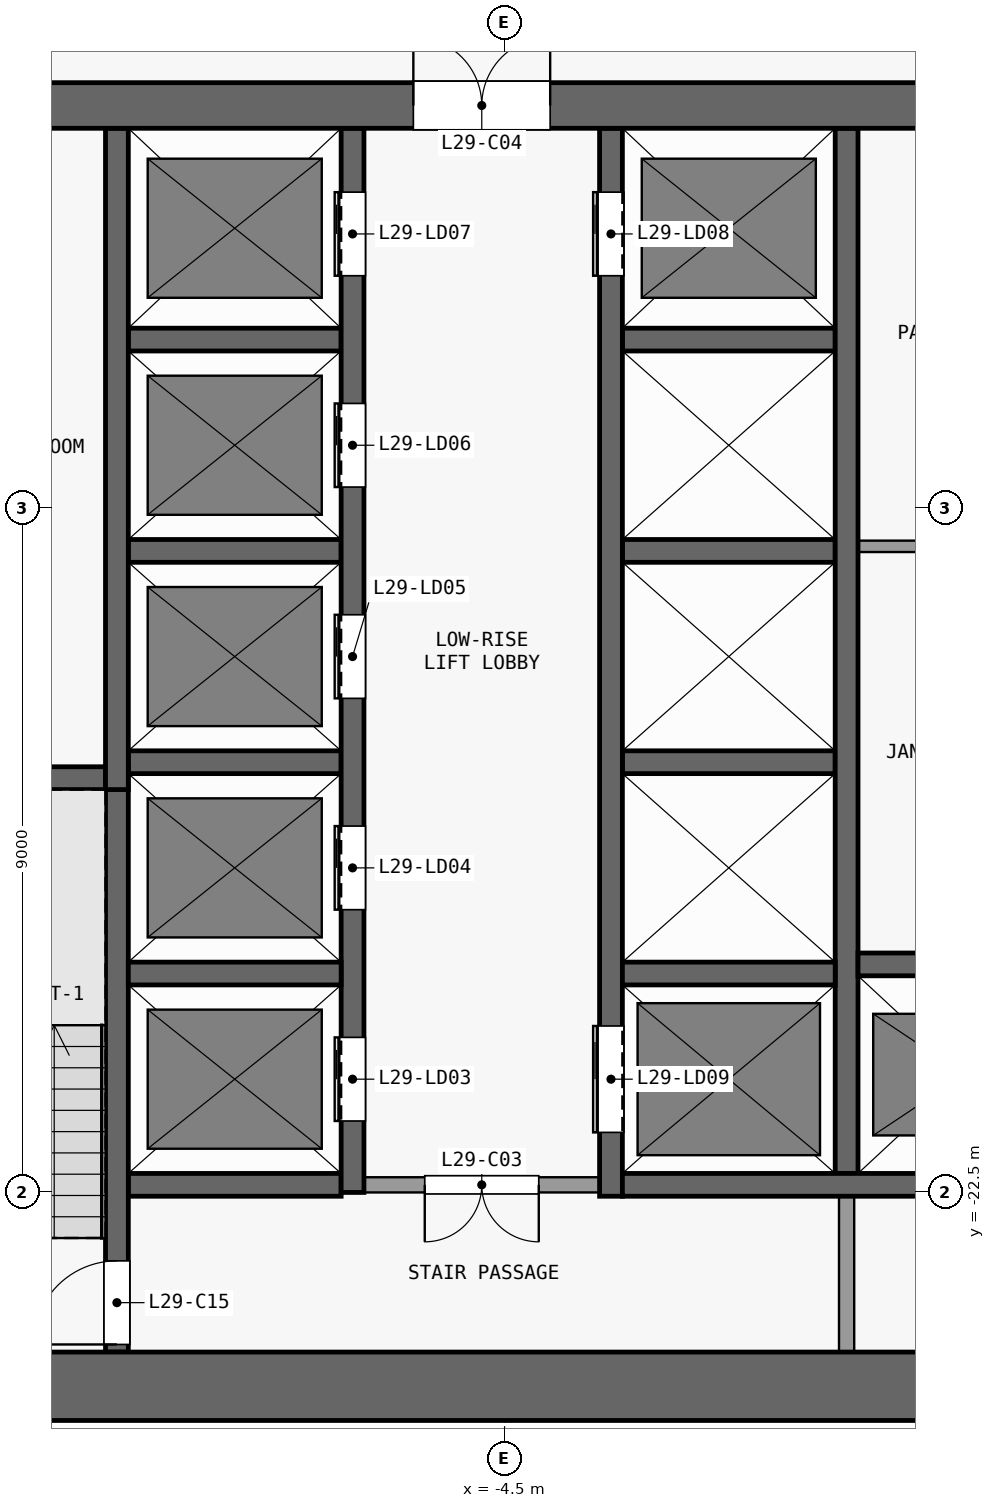
"""IFC4 building model, lengths in metres.
Left out: names, types, materials, properties, quantities, classifications, styles, units other than length and angle.
Written with IfcOpenShell. Run it as: python <this file> out.ifc"""

import sys

from ifc_helpers import new_model, si_unit, direction, frame, frame_2d, origin, place, context, subcontext, project, spatial, rectangle, extrude, element, fill, save


model = new_model("IFC4")
c1 = context("Model", 3, precision=1e-05, world=origin(), true_north=direction((0.0, 1.0)))
c2 = subcontext(c1, "Body", "Model", "MODEL_VIEW")
j1 = project(units=[si_unit("LENGTHUNIT", "METRE"), si_unit("PLANEANGLEUNIT", "RADIAN")], contexts=[c1])
p1 = place(None, origin())
s1 = spatial("IfcSite", under=j1, at=p1, CompositionType="ELEMENT")
p2 = place(p1, origin())
s2 = spatial("IfcBuilding", under=s1, at=p2, CompositionType="ELEMENT")
p3 = place(p2, frame((0.0, 0.0, 117.1)))
s3 = spatial("IfcBuildingStorey", under=s2, at=p3, CompositionType="ELEMENT", Elevation=117.1)
p4 = place(p3, frame((-13.4, -25.05, 0.0), z_axis=(0.0, 0.0, 1.0), x_axis=(1.0, 0.0, 0.0)))
e1 = element("IfcWall", 1, at=p4, inside=s3, PredefinedType="SHEAR", context=c2, shape_type="SweptSolid", body=[
    extrude(rectangle(XDim=26.8, YDim=0.9, at=frame_2d((13.4, 0.0))), origin(), (0.0, 0.0, 1.0), 3.3),
])
p5 = place(p3, frame((-13.4, -8.2, 0.0), z_axis=(0.0, 0.0, 1.0), x_axis=(1.0, 0.0, 0.0)))
e2 = element("IfcWall", 2, at=p5, inside=s3, PredefinedType="SHEAR", context=c2, shape_type="SweptSolid", body=[
    extrude(rectangle(XDim=26.8, YDim=0.6, at=frame_2d((13.4, 0.0))), origin(), (0.0, 0.0, 1.0), 3.3),
])
p6 = place(p5, frame((7.7, 0.0, 0.0)))
e3 = element("IfcOpeningElement", 3, at=p6, cuts=e2, PredefinedType="OPENING", context=c2, shape_type="SweptSolid", body=[
    extrude(rectangle(XDim=1.8, YDim=2.1, at=frame_2d((0.9, 1.05))), frame((0.0, 0.31, 0.0), z_axis=(0.0, -1.0, 0.0), x_axis=(1.0, 0.0, 0.0)), (0.0, 0.0, 1.0), 0.62),
])
p7 = place(p5, frame((17.3, 0.0, 0.0)))
e4 = element("IfcOpeningElement", 4, at=p7, cuts=e2, PredefinedType="OPENING", context=c2, shape_type="SweptSolid", body=[
    extrude(rectangle(XDim=1.8, YDim=2.1, at=frame_2d((0.9, 1.05))), frame((0.0, 0.31, 0.0), z_axis=(0.0, -1.0, 0.0), x_axis=(1.0, 0.0, 0.0)), (0.0, 0.0, 1.0), 0.62),
])
p8 = place(p5, frame((1.625, 0.0, 0.0)))
e5 = element("IfcOpeningElement", 5, at=p8, cuts=e2, PredefinedType="OPENING", context=c2, shape_type="SweptSolid", body=[
    extrude(rectangle(XDim=1.2, YDim=2.1, at=frame_2d((0.6, 1.05))), frame((0.0, 0.31, 0.0), z_axis=(0.0, -1.0, 0.0), x_axis=(1.0, 0.0, 0.0)), (0.0, 0.0, 1.0), 0.62),
])
p9 = place(p5, frame((23.275, 0.0, 0.0)))
e6 = element("IfcOpeningElement", 6, at=p9, cuts=e2, PredefinedType="OPENING", context=c2, shape_type="SweptSolid", body=[
    extrude(rectangle(XDim=0.9, YDim=2.1, at=frame_2d((0.45, 1.05))), frame((0.0, 0.31, 0.0), z_axis=(0.0, -1.0, 0.0), x_axis=(1.0, 0.0, 0.0)), (0.0, 0.0, 1.0), 0.62),
])
p10 = place(p3, frame((-9.45, -22.4, 0.0), z_axis=(0.0, 0.0, 1.0), x_axis=(1.0, 0.0, 0.0)))
e7 = element("IfcWall", 7, at=p10, inside=s3, PredefinedType="SHEAR", context=c2, shape_type="SweptSolid", body=[
    extrude(rectangle(XDim=2.8, YDim=0.3, at=frame_2d((1.4, 0.0))), origin(), (0.0, 0.0, 1.0), 3.3),
])
p11 = place(p3, frame((-3.25, -22.4, 0.0), z_axis=(0.0, 0.0, 1.0), x_axis=(-1.0, 0.0, 0.0)))
e8 = element("IfcWall", 8, at=p11, inside=s3, PredefinedType="PARTITIONING", context=c2, shape_type="SweptSolid", body=[
    extrude(rectangle(XDim=3.1, YDim=0.2, at=frame_2d((1.55, 0.0))), origin(), (0.0, 0.0, 1.0), 3.3),
])
p12 = place(p11, frame((0.8, 0.0, 0.0)))
e9 = element("IfcOpeningElement", 9, at=p12, cuts=e8, PredefinedType="OPENING", context=c2, shape_type="SweptSolid", body=[
    extrude(rectangle(XDim=1.5, YDim=2.1, at=frame_2d((0.75, 1.05))), frame((0.0, 0.11, 0.0), z_axis=(0.0, -1.0, 0.0), x_axis=(1.0, 0.0, 0.0)), (0.0, 0.0, 1.0), 0.22),
])
p13 = place(p3, frame((-2.95, -22.4, 0.0), z_axis=(0.0, 0.0, 1.0), x_axis=(1.0, 0.0, 0.0)))
e10 = element("IfcWall", 10, at=p13, inside=s3, PredefinedType="SHEAR", context=c2, shape_type="SweptSolid", body=[
    extrude(rectangle(XDim=6.2, YDim=0.3, at=frame_2d((3.1, 0.0))), origin(), (0.0, 0.0, 1.0), 3.3),
])
for number, where, z_axis, x_axis in (
    (11, (-9.45, -19.62, 0.0), (0.0, 0.0, 1.0), (1.0, 0.0, 0.0)),
    (12, (-2.95, -19.62, 0.0), (0.0, 0.0, 1.0), (1.0, 0.0, 0.0)),
):
    element("IfcWall", number, at=place(p3, frame(where, z_axis=z_axis, x_axis=x_axis)), inside=s3, PredefinedType="SHEAR", context=c2, shape_type="SweptSolid", body=[
        extrude(rectangle(XDim=2.8, YDim=0.3, at=frame_2d((1.4, 0.0))), origin(), (0.0, 0.0, 1.0), 3.3),
    ])
p14 = place(p3, frame((0.15, -19.5, 0.0), z_axis=(0.0, 0.0, 1.0), x_axis=(1.0, 0.0, 0.0)))
e13 = element("IfcWall", 13, at=p14, inside=s3, PredefinedType="SHEAR", context=c2, shape_type="SweptSolid", body=[
    extrude(rectangle(XDim=3.025, YDim=0.3, at=frame_2d((1.513, 0.0))), origin(), (0.0, 0.0, 1.0), 3.3),
])
p15 = place(p3, frame((-12.6, -17.05, 0.0), z_axis=(0.0, 0.0, 1.0), x_axis=(1.0, 0.0, 0.0)))
e14 = element("IfcWall", 14, at=p15, inside=s3, PredefinedType="SHEAR", context=c2, shape_type="SweptSolid", body=[
    extrude(rectangle(XDim=2.85, YDim=0.3, at=frame_2d((1.425, 0.0))), origin(), (0.0, 0.0, 1.0), 3.3),
])
for number, where, z_axis, x_axis in (
    (15, (-9.45, -16.84, 0.0), (0.0, 0.0, 1.0), (1.0, 0.0, 0.0)),
    (16, (-2.95, -16.84, 0.0), (0.0, 0.0, 1.0), (1.0, 0.0, 0.0)),
    (17, (-9.45, -14.06, 0.0), (0.0, 0.0, 1.0), (1.0, 0.0, 0.0)),
    (18, (-2.95, -14.06, 0.0), (0.0, 0.0, 1.0), (1.0, 0.0, 0.0)),
):
    element("IfcWall", number, at=place(p3, frame(where, z_axis=z_axis, x_axis=x_axis)), inside=s3, PredefinedType="SHEAR", context=c2, shape_type="SweptSolid", body=[
        extrude(rectangle(XDim=2.8, YDim=0.3, at=frame_2d((1.4, 0.0))), origin(), (0.0, 0.0, 1.0), 3.3),
    ])
p16 = place(p3, frame((0.15, -14.0, 0.0), z_axis=(0.0, 0.0, 1.0), x_axis=(1.0, 0.0, 0.0)))
e19 = element("IfcWall", 19, at=p16, inside=s3, PredefinedType="PARTITIONING", context=c2, shape_type="SweptSolid", body=[
    extrude(rectangle(XDim=2.875, YDim=0.15, at=frame_2d((1.438, 0.0))), origin(), (0.0, 0.0, 1.0), 3.3),
])
for number, where, z_axis, x_axis in (
    (20, (-9.45, -11.28, 0.0), (0.0, 0.0, 1.0), (1.0, 0.0, 0.0)),
    (21, (-2.95, -11.28, 0.0), (0.0, 0.0, 1.0), (1.0, 0.0, 0.0)),
):
    element("IfcWall", number, at=place(p3, frame(where, z_axis=z_axis, x_axis=x_axis)), inside=s3, PredefinedType="SHEAR", context=c2, shape_type="SweptSolid", body=[
        extrude(rectangle(XDim=2.8, YDim=0.3, at=frame_2d((1.4, 0.0))), origin(), (0.0, 0.0, 1.0), 3.3),
    ])
p17 = place(p3, frame((-9.6, -24.6, 0.0), z_axis=(0.0, 0.0, 1.0), x_axis=(0.0, 1.0, 0.0)))
e22 = element("IfcWall", 22, at=p17, inside=s3, PredefinedType="SHEAR", context=c2, shape_type="SweptSolid", body=[
    extrude(rectangle(XDim=7.7, YDim=0.3, at=frame_2d((3.85, 0.0))), origin(), (0.0, 0.0, 1.0), 3.3),
])
p18 = place(p17, frame((0.1, 0.0, 0.0)))
e23 = element("IfcOpeningElement", 23, at=p18, cuts=e22, PredefinedType="OPENING", context=c2, shape_type="SweptSolid", body=[
    extrude(rectangle(XDim=1.1, YDim=2.1, at=frame_2d((0.55, 1.05))), frame((0.0, 0.16, 0.0), z_axis=(0.0, -1.0, 0.0), x_axis=(1.0, 0.0, 0.0)), (0.0, 0.0, 1.0), 0.32),
])
p19 = place(p3, frame((-9.6, -17.2, 0.0), z_axis=(0.0, 0.0, 1.0), x_axis=(0.0, 1.0, 0.0)))
e24 = element("IfcWall", 24, at=p19, inside=s3, PredefinedType="SHEAR", context=c2, shape_type="SweptSolid", body=[
    extrude(rectangle(XDim=8.7, YDim=0.3, at=frame_2d((4.35, 0.0))), origin(), (0.0, 0.0, 1.0), 3.3),
])
p20 = place(p3, frame((-6.5, -22.5, 0.0), z_axis=(0.0, 0.0, 1.0), x_axis=(0.0, 1.0, 0.0)))
e25 = element("IfcWall", 25, at=p20, inside=s3, PredefinedType="SHEAR", context=c2, shape_type="SweptSolid", body=[
    extrude(rectangle(XDim=14.0, YDim=0.3, at=frame_2d((7.0, 0.0))), origin(), (0.0, 0.0, 1.0), 3.3),
])
p21 = place(p20, frame((0.94, 0.0, 0.0)))
e26 = element("IfcOpeningElement", 26, at=p21, cuts=e25, PredefinedType="OPENING", context=c2, shape_type="SweptSolid", body=[
    extrude(rectangle(XDim=1.1, YDim=2.1, at=frame_2d((0.55, 1.05))), frame((0.0, 0.16, 0.0), z_axis=(0.0, -1.0, 0.0), x_axis=(1.0, 0.0, 0.0)), (0.0, 0.0, 1.0), 0.32),
])
p22 = place(p20, frame((3.72, 0.0, 0.0)))
e27 = element("IfcOpeningElement", 27, at=p22, cuts=e25, PredefinedType="OPENING", context=c2, shape_type="SweptSolid", body=[
    extrude(rectangle(XDim=1.1, YDim=2.1, at=frame_2d((0.55, 1.05))), frame((0.0, 0.16, 0.0), z_axis=(0.0, -1.0, 0.0), x_axis=(1.0, 0.0, 0.0)), (0.0, 0.0, 1.0), 0.32),
])
p23 = place(p20, frame((6.5, 0.0, 0.0)))
e28 = element("IfcOpeningElement", 28, at=p23, cuts=e25, PredefinedType="OPENING", context=c2, shape_type="SweptSolid", body=[
    extrude(rectangle(XDim=1.1, YDim=2.1, at=frame_2d((0.55, 1.05))), frame((0.0, 0.16, 0.0), z_axis=(0.0, -1.0, 0.0), x_axis=(1.0, 0.0, 0.0)), (0.0, 0.0, 1.0), 0.32),
])
p24 = place(p20, frame((9.28, 0.0, 0.0)))
e29 = element("IfcOpeningElement", 29, at=p24, cuts=e25, PredefinedType="OPENING", context=c2, shape_type="SweptSolid", body=[
    extrude(rectangle(XDim=1.1, YDim=2.1, at=frame_2d((0.55, 1.05))), frame((0.0, 0.16, 0.0), z_axis=(0.0, -1.0, 0.0), x_axis=(1.0, 0.0, 0.0)), (0.0, 0.0, 1.0), 0.32),
])
p25 = place(p20, frame((12.06, 0.0, 0.0)))
e30 = element("IfcOpeningElement", 30, at=p25, cuts=e25, PredefinedType="OPENING", context=c2, shape_type="SweptSolid", body=[
    extrude(rectangle(XDim=1.1, YDim=2.1, at=frame_2d((0.55, 1.05))), frame((0.0, 0.16, 0.0), z_axis=(0.0, -1.0, 0.0), x_axis=(1.0, 0.0, 0.0)), (0.0, 0.0, 1.0), 0.32),
])
p26 = place(p3, frame((-3.1, -22.55, 0.0), z_axis=(0.0, 0.0, 1.0), x_axis=(0.0, 1.0, 0.0)))
e31 = element("IfcWall", 31, at=p26, inside=s3, PredefinedType="SHEAR", context=c2, shape_type="SweptSolid", body=[
    extrude(rectangle(XDim=14.05, YDim=0.3, at=frame_2d((7.025, 0.0))), origin(), (0.0, 0.0, 1.0), 3.3),
])
p27 = place(p26, frame((12.11, 0.0, 0.0)))
e32 = element("IfcOpeningElement", 32, at=p27, cuts=e31, PredefinedType="OPENING", context=c2, shape_type="SweptSolid", body=[
    extrude(rectangle(XDim=1.1, YDim=2.1, at=frame_2d((0.55, 1.05))), frame((0.0, 0.16, 0.0), z_axis=(0.0, -1.0, 0.0), x_axis=(1.0, 0.0, 0.0)), (0.0, 0.0, 1.0), 0.32),
])
p28 = place(p26, frame((0.84, 0.0, 0.0)))
e33 = element("IfcOpeningElement", 33, at=p28, cuts=e31, PredefinedType="OPENING", context=c2, shape_type="SweptSolid", body=[
    extrude(rectangle(XDim=1.4, YDim=2.1, at=frame_2d((0.7, 1.05))), frame((0.0, 0.16, 0.0), z_axis=(0.0, -1.0, 0.0), x_axis=(1.0, 0.0, 0.0)), (0.0, 0.0, 1.0), 0.32),
])
p29 = place(p3, frame((0.0, -24.6, 0.0), z_axis=(0.0, 0.0, 1.0), x_axis=(0.0, 1.0, 0.0)))
e34 = element("IfcWall", 34, at=p29, inside=s3, PredefinedType="PARTITIONING", context=c2, shape_type="SweptSolid", body=[
    extrude(rectangle(XDim=2.05, YDim=0.2, at=frame_2d((1.025, 0.0))), origin(), (0.0, 0.0, 1.0), 3.3),
])
p30 = place(p3, frame((0.0, -22.25, 0.0), z_axis=(0.0, 0.0, 1.0), x_axis=(0.0, 1.0, 0.0)))
e35 = element("IfcWall", 35, at=p30, inside=s3, PredefinedType="SHEAR", context=c2, shape_type="SweptSolid", body=[
    extrude(rectangle(XDim=13.75, YDim=0.3, at=frame_2d((6.875, 0.0))), origin(), (0.0, 0.0, 1.0), 3.3),
])
p31 = place(p21, origin())
e36 = element("IfcDoor", 36, at=p31, inside=s3, OperationType="DOUBLE_DOOR_SLIDING", PredefinedType="DOOR", context=c2, shape_type="SweptSolid", body=[
    extrude(rectangle(XDim=1.1, YDim=2.1, at=frame_2d((0.55, 1.05))), frame((0.0, 0.025, 0.0), z_axis=(0.0, -1.0, 0.0), x_axis=(1.0, 0.0, 0.0)), (0.0, 0.0, 1.0), 0.05),
])
fill(e26, e36)
p32 = place(p22, origin())
e37 = element("IfcDoor", 37, at=p32, inside=s3, OperationType="DOUBLE_DOOR_SLIDING", PredefinedType="DOOR", context=c2, shape_type="SweptSolid", body=[
    extrude(rectangle(XDim=1.1, YDim=2.1, at=frame_2d((0.55, 1.05))), frame((0.0, 0.025, 0.0), z_axis=(0.0, -1.0, 0.0), x_axis=(1.0, 0.0, 0.0)), (0.0, 0.0, 1.0), 0.05),
])
fill(e27, e37)
p33 = place(p23, origin())
e38 = element("IfcDoor", 38, at=p33, inside=s3, OperationType="DOUBLE_DOOR_SLIDING", PredefinedType="DOOR", context=c2, shape_type="SweptSolid", body=[
    extrude(rectangle(XDim=1.1, YDim=2.1, at=frame_2d((0.55, 1.05))), frame((0.0, 0.025, 0.0), z_axis=(0.0, -1.0, 0.0), x_axis=(1.0, 0.0, 0.0)), (0.0, 0.0, 1.0), 0.05),
])
fill(e28, e38)
p34 = place(p24, origin())
e39 = element("IfcDoor", 39, at=p34, inside=s3, OperationType="DOUBLE_DOOR_SLIDING", PredefinedType="DOOR", context=c2, shape_type="SweptSolid", body=[
    extrude(rectangle(XDim=1.1, YDim=2.1, at=frame_2d((0.55, 1.05))), frame((0.0, 0.025, 0.0), z_axis=(0.0, -1.0, 0.0), x_axis=(1.0, 0.0, 0.0)), (0.0, 0.0, 1.0), 0.05),
])
fill(e29, e39)
p35 = place(p25, origin())
e40 = element("IfcDoor", 40, at=p35, inside=s3, OperationType="DOUBLE_DOOR_SLIDING", PredefinedType="DOOR", context=c2, shape_type="SweptSolid", body=[
    extrude(rectangle(XDim=1.1, YDim=2.1, at=frame_2d((0.55, 1.05))), frame((0.0, 0.025, 0.0), z_axis=(0.0, -1.0, 0.0), x_axis=(1.0, 0.0, 0.0)), (0.0, 0.0, 1.0), 0.05),
])
fill(e30, e40)
p36 = place(p27, origin())
e41 = element("IfcDoor", 41, at=p36, inside=s3, OperationType="DOUBLE_DOOR_SLIDING", PredefinedType="DOOR", context=c2, shape_type="SweptSolid", body=[
    extrude(rectangle(XDim=1.1, YDim=2.1, at=frame_2d((0.55, 1.05))), frame((0.0, 0.025, 0.0), z_axis=(0.0, -1.0, 0.0), x_axis=(1.0, 0.0, 0.0)), (0.0, 0.0, 1.0), 0.05),
])
fill(e32, e41)
p37 = place(p28, origin())
e42 = element("IfcDoor", 42, at=p37, inside=s3, OperationType="DOUBLE_DOOR_SLIDING", PredefinedType="DOOR", context=c2, shape_type="SweptSolid", body=[
    extrude(rectangle(XDim=1.4, YDim=2.1, at=frame_2d((0.7, 1.05))), frame((0.0, 0.025, 0.0), z_axis=(0.0, -1.0, 0.0), x_axis=(1.0, 0.0, 0.0)), (0.0, 0.0, 1.0), 0.05),
])
fill(e33, e42)
p38 = place(p12, origin())
e43 = element("IfcDoor", 43, at=p38, inside=s3, OperationType="DOUBLE_DOOR_SINGLE_SWING", PredefinedType="DOOR", context=c2, shape_type="SweptSolid", body=[
    extrude(rectangle(XDim=1.5, YDim=2.1, at=frame_2d((0.75, 1.05))), frame((0.0, 0.025, 0.0), z_axis=(0.0, -1.0, 0.0), x_axis=(1.0, 0.0, 0.0)), (0.0, 0.0, 1.0), 0.05),
])
fill(e9, e43)
p39 = place(p6, origin())
e44 = element("IfcDoor", 44, at=p39, inside=s3, OperationType="DOUBLE_DOOR_SINGLE_SWING", PredefinedType="DOOR", context=c2, shape_type="SweptSolid", body=[
    extrude(rectangle(XDim=1.8, YDim=2.1, at=frame_2d((0.9, 1.05))), frame((0.0, 0.025, 0.0), z_axis=(0.0, -1.0, 0.0), x_axis=(1.0, 0.0, 0.0)), (0.0, 0.0, 1.0), 0.05),
])
fill(e3, e44)
p40 = place(p18, origin())
e45 = element("IfcDoor", 45, at=p40, inside=s3, OperationType="SINGLE_SWING_LEFT", PredefinedType="DOOR", context=c2, shape_type="SweptSolid", body=[
    extrude(rectangle(XDim=1.1, YDim=2.1, at=frame_2d((0.55, 1.05))), frame((0.0, 0.025, 0.0), z_axis=(0.0, -1.0, 0.0), x_axis=(1.0, 0.0, 0.0)), (0.0, 0.0, 1.0), 0.05),
])
fill(e23, e45)
save(model, sys.argv[1])
